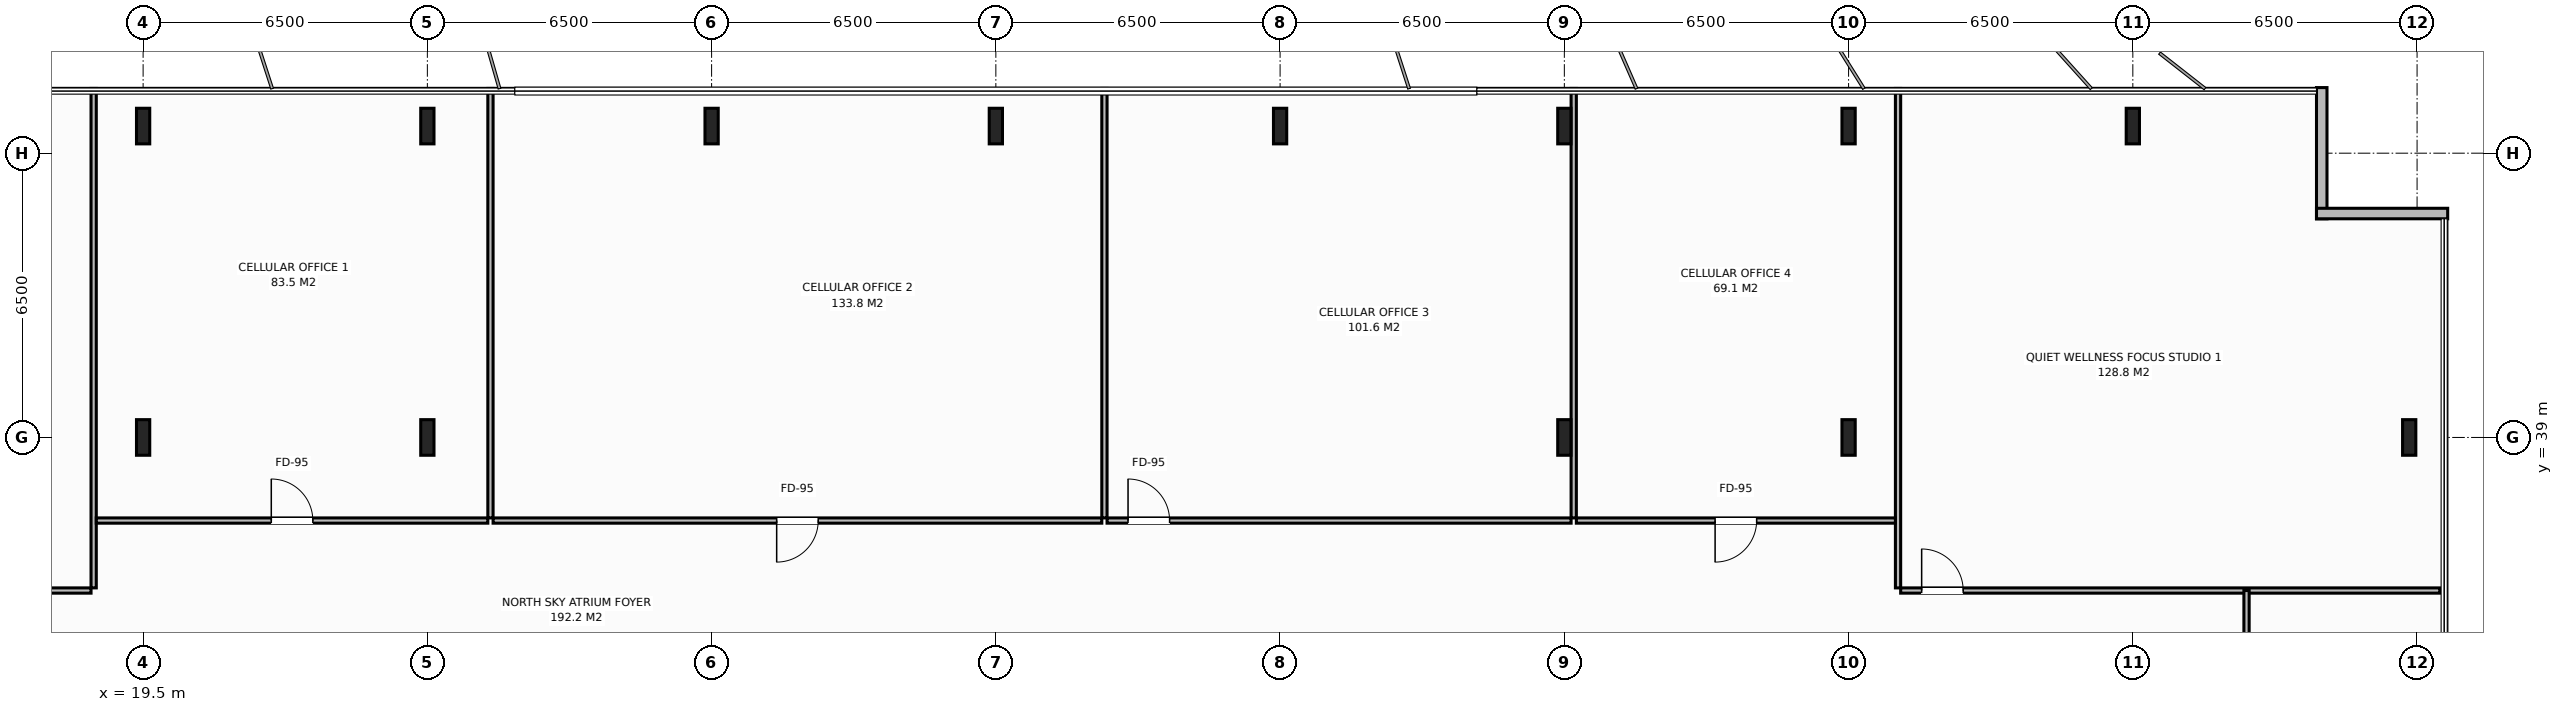
"""IFC4 building model, lengths in metres.
Left out: names, types, materials, properties, quantities, classifications, styles, units other than length and angle.
Written with IfcOpenShell. Run it as: python <this file> out.ifc"""

import sys

from ifc_helpers import new_model, si_unit, direction, frame, frame_2d, origin, origin_2d, place, context, subcontext, project, spatial, rectangle, i_section, extrude, element, fill, save


model = new_model("IFC4")
c1 = context("Model", 3, precision=1e-05, world=origin(), true_north=direction((0.0, 1.0)))
c2 = subcontext(c1, "Body", "Model", "MODEL_VIEW")
j1 = project(units=[si_unit("LENGTHUNIT", "METRE"), si_unit("PLANEANGLEUNIT", "RADIAN")], contexts=[c1])
p1 = place(None, origin())
s1 = spatial("IfcSite", under=j1, at=p1, CompositionType="ELEMENT")
p2 = place(p1, origin())
s2 = spatial("IfcBuilding", under=s1, at=p2, CompositionType="ELEMENT")
p3 = place(p2, frame((0.0, 0.0, 221.4)))
s3 = spatial("IfcBuildingStorey", under=s2, at=p3, CompositionType="ELEMENT", Elevation=221.4)
for number, where, z_axis, x_axis in (
    (1, (19.5, 39.0, 0.0), (0.0, 0.0, 1.0), (1.0, 0.0, 0.0)),
    (2, (58.5, 39.0, 0.0), (0.0, 0.0, 1.0), (1.0, 0.0, 0.0)),
    (3, (26.0, 39.0, 0.0), (0.0, 0.0, 1.0), (1.0, 0.0, 0.0)),
    (4, (52.0, 39.0, 0.0), (0.0, 0.0, 1.0), (1.0, 0.0, 0.0)),
    (5, (19.5, 46.12, 0.0), (0.0, 0.0, 1.0), (1.0, 0.0, 0.0)),
    (6, (26.0, 46.12, 0.0), (0.0, 0.0, 1.0), (1.0, 0.0, 0.0)),
    (7, (32.5, 46.12, 0.0), (0.0, 0.0, 1.0), (1.0, 0.0, 0.0)),
    (8, (39.0, 46.12, 0.0), (0.0, 0.0, 1.0), (1.0, 0.0, 0.0)),
    (9, (45.5, 46.12, 0.0), (0.0, 0.0, 1.0), (1.0, 0.0, 0.0)),
    (10, (52.0, 46.12, 0.0), (0.0, 0.0, 1.0), (1.0, 0.0, 0.0)),
    (11, (58.5, 46.12, 0.0), (0.0, 0.0, 1.0), (1.0, 0.0, 0.0)),
    (12, (65.0, 46.12, 0.0), (0.0, 0.0, 1.0), (1.0, 0.0, 0.0)),
    (13, (71.32, 39.0, 0.0), (0.0, 0.0, 1.0), (1.0, 0.0, 0.0)),
):
    element("IfcColumn", number, at=place(p3, frame(where, z_axis=z_axis, x_axis=x_axis)), inside=s3, PredefinedType="COLUMN", context=c2, shape_type="SweptSolid", body=[
        extrude(i_section(OverallWidth=0.303, OverallDepth=0.814, WebThickness=0.021, FlangeThickness=0.04, at=origin_2d()), origin(), (0.0, 0.0, 1.0), 3.8),
    ])
for number, where, z_axis, x_axis in (
    (14, (69.32, 47.0, 0.0), (0.0, 0.0, 1.0), (0.0, -1.0, 0.0)),
    (15, (69.2, 44.12, 0.0), (0.0, 0.0, 1.0), (1.0, 0.0, 0.0)),
):
    element("IfcWall", number, at=place(p3, frame(where, z_axis=z_axis, x_axis=x_axis)), inside=s3, PredefinedType="STANDARD", context=c2, shape_type="SweptSolid", body=[
        extrude(rectangle(XDim=3.0, YDim=0.24, at=frame_2d((1.5, 0.0))), origin(), (0.0, 0.0, 1.0), 3.58),
    ])
p4 = place(p3, frame((18.369, 35.56, 0.0), z_axis=(0.0, 0.0, 1.0), x_axis=(0.0, 1.0, 0.0)))
e16 = element("IfcWall", 16, at=p4, inside=s3, PredefinedType="PARTITIONING", context=c2, shape_type="SweptSolid", body=[
    extrude(rectangle(XDim=11.42, YDim=0.12, at=frame_2d((5.71, 0.0))), origin(), (0.0, 0.0, 1.0), 3.58),
])
p5 = place(p3, frame((5.98, 35.5, 0.0), z_axis=(0.0, 0.0, 1.0), x_axis=(1.0, 0.0, 0.0)))
e17 = element("IfcWall", 17, at=p5, inside=s3, PredefinedType="PARTITIONING", context=c2, shape_type="SweptSolid", body=[
    extrude(rectangle(XDim=12.329, YDim=0.12, at=frame_2d((6.165, 0.0))), origin(), (0.0, 0.0, 1.0), 3.58),
])
p6 = place(p5, frame((4.9, 0.0, 0.0)))
e18 = element("IfcOpeningElement", 18, at=p6, cuts=e17, PredefinedType="OPENING", context=c2, shape_type="SweptSolid", body=[
    extrude(rectangle(XDim=0.95, YDim=2.15, at=frame_2d((0.475, 1.075))), frame((0.0, 0.07, 0.0), z_axis=(0.0, -1.0, 0.0), x_axis=(1.0, 0.0, 0.0)), (0.0, 0.0, 1.0), 0.14),
])
p7 = place(p3, frame((27.443, 37.16, 0.0), z_axis=(0.0, 0.0, 1.0), x_axis=(0.0, 1.0, 0.0)))
e19 = element("IfcWall", 19, at=p7, inside=s3, PredefinedType="PARTITIONING", context=c2, shape_type="SweptSolid", body=[
    extrude(rectangle(XDim=9.82, YDim=0.12, at=frame_2d((4.91, 0.0))), origin(), (0.0, 0.0, 1.0), 3.58),
])
p8 = place(p3, frame((18.429, 37.1, 0.0), z_axis=(0.0, 0.0, 1.0), x_axis=(1.0, 0.0, 0.0)))
e20 = element("IfcWall", 20, at=p8, inside=s3, PredefinedType="PARTITIONING", context=c2, shape_type="SweptSolid", body=[
    extrude(rectangle(XDim=8.954, YDim=0.12, at=frame_2d((4.477, 0.0))), origin(), (0.0, 0.0, 1.0), 3.58),
])
p9 = place(p8, frame((4.002, 0.0, 0.0)))
e21 = element("IfcOpeningElement", 21, at=p9, cuts=e20, PredefinedType="OPENING", context=c2, shape_type="SweptSolid", body=[
    extrude(rectangle(XDim=0.95, YDim=2.15, at=frame_2d((0.475, 1.075))), frame((0.0, 0.07, 0.0), z_axis=(0.0, -1.0, 0.0), x_axis=(1.0, 0.0, 0.0)), (0.0, 0.0, 1.0), 0.14),
])
p10 = place(p3, frame((41.483, 37.16, 0.0), z_axis=(0.0, 0.0, 1.0), x_axis=(0.0, 1.0, 0.0)))
e22 = element("IfcWall", 22, at=p10, inside=s3, PredefinedType="PARTITIONING", context=c2, shape_type="SweptSolid", body=[
    extrude(rectangle(XDim=9.82, YDim=0.12, at=frame_2d((4.91, 0.0))), origin(), (0.0, 0.0, 1.0), 3.58),
])
p11 = place(p3, frame((27.503, 37.1, 0.0), z_axis=(0.0, 0.0, 1.0), x_axis=(1.0, 0.0, 0.0)))
e23 = element("IfcWall", 23, at=p11, inside=s3, PredefinedType="PARTITIONING", context=c2, shape_type="SweptSolid", body=[
    extrude(rectangle(XDim=13.92, YDim=0.12, at=frame_2d((6.96, 0.0))), origin(), (0.0, 0.0, 1.0), 3.58),
])
p12 = place(p11, frame((6.485, 0.0, 0.0)))
e24 = element("IfcOpeningElement", 24, at=p12, cuts=e23, PredefinedType="OPENING", context=c2, shape_type="SweptSolid", body=[
    extrude(rectangle(XDim=0.95, YDim=2.15, at=frame_2d((0.475, 1.075))), frame((0.0, 0.07, 0.0), z_axis=(0.0, -1.0, 0.0), x_axis=(1.0, 0.0, 0.0)), (0.0, 0.0, 1.0), 0.14),
])
p13 = place(p3, frame((52.215, 37.16, 0.0), z_axis=(0.0, 0.0, 1.0), x_axis=(0.0, 1.0, 0.0)))
e25 = element("IfcWall", 25, at=p13, inside=s3, PredefinedType="PARTITIONING", context=c2, shape_type="SweptSolid", body=[
    extrude(rectangle(XDim=9.82, YDim=0.12, at=frame_2d((4.91, 0.0))), origin(), (0.0, 0.0, 1.0), 2.88),
])
p14 = place(p3, frame((41.543, 37.1, 0.0), z_axis=(0.0, 0.0, 1.0), x_axis=(1.0, 0.0, 0.0)))
e26 = element("IfcWall", 26, at=p14, inside=s3, PredefinedType="PARTITIONING", context=c2, shape_type="SweptSolid", body=[
    extrude(rectangle(XDim=10.611, YDim=0.12, at=frame_2d((5.306, 0.0))), origin(), (0.0, 0.0, 1.0), 3.58),
])
p15 = place(p14, frame((0.48, 0.0, 0.0)))
e27 = element("IfcOpeningElement", 27, at=p15, cuts=e26, PredefinedType="OPENING", context=c2, shape_type="SweptSolid", body=[
    extrude(rectangle(XDim=0.95, YDim=2.15, at=frame_2d((0.475, 1.075))), frame((0.0, 0.07, 0.0), z_axis=(0.0, -1.0, 0.0), x_axis=(1.0, 0.0, 0.0)), (0.0, 0.0, 1.0), 0.14),
])
p16 = place(p3, frame((59.631, 35.56, 0.0), z_axis=(0.0, 0.0, 1.0), x_axis=(0.0, 1.0, 0.0)))
e28 = element("IfcWall", 28, at=p16, inside=s3, PredefinedType="PARTITIONING", context=c2, shape_type="SweptSolid", body=[
    extrude(rectangle(XDim=11.42, YDim=0.12, at=frame_2d((5.71, 0.0))), origin(), (0.0, 0.0, 1.0), 3.58),
])
p17 = place(p3, frame((52.275, 37.1, 0.0), z_axis=(0.0, 0.0, 1.0), x_axis=(1.0, 0.0, 0.0)))
e29 = element("IfcWall", 29, at=p17, inside=s3, PredefinedType="PARTITIONING", context=c2, shape_type="SweptSolid", body=[
    extrude(rectangle(XDim=7.296, YDim=0.12, at=frame_2d((3.648, 0.0))), origin(), (0.0, 0.0, 1.0), 3.58),
])
p18 = place(p17, frame((3.173, 0.0, 0.0)))
e30 = element("IfcOpeningElement", 30, at=p18, cuts=e29, PredefinedType="OPENING", context=c2, shape_type="SweptSolid", body=[
    extrude(rectangle(XDim=0.95, YDim=2.15, at=frame_2d((0.475, 1.075))), frame((0.0, 0.07, 0.0), z_axis=(0.0, -1.0, 0.0), x_axis=(1.0, 0.0, 0.0)), (0.0, 0.0, 1.0), 0.14),
])
p19 = place(p3, frame((59.691, 35.5, 0.0), z_axis=(0.0, 0.0, 1.0), x_axis=(1.0, 0.0, 0.0)))
e31 = element("IfcWall", 31, at=p19, inside=s3, PredefinedType="PARTITIONING", context=c2, shape_type="SweptSolid", body=[
    extrude(rectangle(XDim=12.329, YDim=0.12, at=frame_2d((6.165, 0.0))), origin(), (0.0, 0.0, 1.0), 3.58),
])
p20 = place(p19, frame((0.48, 0.0, 0.0)))
e32 = element("IfcOpeningElement", 32, at=p20, cuts=e31, PredefinedType="OPENING", context=c2, shape_type="SweptSolid", body=[
    extrude(rectangle(XDim=0.95, YDim=2.15, at=frame_2d((0.475, 1.075))), frame((0.0, 0.07, 0.0), z_axis=(0.0, -1.0, 0.0), x_axis=(1.0, 0.0, 0.0)), (0.0, 0.0, 1.0), 0.14),
])
p21 = place(p3, frame((67.6, 16.5, 0.0), z_axis=(0.0, 0.0, 1.0), x_axis=(0.0, 1.0, 0.0)))
e33 = element("IfcWall", 33, at=p21, inside=s3, PredefinedType="PARTITIONING", context=c2, shape_type="SweptSolid", body=[
    extrude(rectangle(XDim=19.0, YDim=0.12, at=frame_2d((9.5, 0.0))), origin(), (0.0, 0.0, 1.0), 3.58),
])
p22 = place(p21, frame((9.025, 0.0, 0.0)))
e34 = element("IfcOpeningElement", 34, at=p22, cuts=e33, PredefinedType="OPENING", context=c2, shape_type="SweptSolid", body=[
    extrude(rectangle(XDim=0.95, YDim=2.15, at=frame_2d((0.475, 1.075))), frame((0.0, 0.07, 0.0), z_axis=(0.0, -1.0, 0.0), x_axis=(1.0, 0.0, 0.0)), (0.0, 0.0, 1.0), 0.14),
])
p23 = place(p9, origin())
e35 = element("IfcDoor", 35, at=p23, inside=s3, OperationType="SINGLE_SWING_LEFT", PredefinedType="DOOR", context=c2, shape_type="SweptSolid", body=[
    extrude(rectangle(XDim=0.95, YDim=2.15, at=frame_2d((0.475, 1.075))), frame((0.0, 0.025, 0.0), z_axis=(0.0, -1.0, 0.0), x_axis=(1.0, 0.0, 0.0)), (0.0, 0.0, 1.0), 0.05),
])
fill(e21, e35)
p24 = place(p12, origin())
e36 = element("IfcDoor", 36, at=p24, inside=s3, OperationType="SINGLE_SWING_RIGHT", PredefinedType="DOOR", context=c2, shape_type="SweptSolid", body=[
    extrude(rectangle(XDim=0.95, YDim=2.15, at=frame_2d((0.475, 1.075))), frame((0.0, 0.025, 0.0), z_axis=(0.0, -1.0, 0.0), x_axis=(1.0, 0.0, 0.0)), (0.0, 0.0, 1.0), 0.05),
])
fill(e24, e36)
p25 = place(p15, origin())
e37 = element("IfcDoor", 37, at=p25, inside=s3, OperationType="SINGLE_SWING_LEFT", PredefinedType="DOOR", context=c2, shape_type="SweptSolid", body=[
    extrude(rectangle(XDim=0.95, YDim=2.15, at=frame_2d((0.475, 1.075))), frame((0.0, 0.025, 0.0), z_axis=(0.0, -1.0, 0.0), x_axis=(1.0, 0.0, 0.0)), (0.0, 0.0, 1.0), 0.05),
])
fill(e27, e37)
p26 = place(p18, origin())
e38 = element("IfcDoor", 38, at=p26, inside=s3, OperationType="SINGLE_SWING_RIGHT", PredefinedType="DOOR", context=c2, shape_type="SweptSolid", body=[
    extrude(rectangle(XDim=0.95, YDim=2.15, at=frame_2d((0.475, 1.075))), frame((0.0, 0.025, 0.0), z_axis=(0.0, -1.0, 0.0), x_axis=(1.0, 0.0, 0.0)), (0.0, 0.0, 1.0), 0.05),
])
fill(e30, e38)
p27 = place(p20, origin())
e39 = element("IfcDoor", 39, at=p27, inside=s3, OperationType="SINGLE_SWING_LEFT", PredefinedType="DOOR", context=c2, shape_type="SweptSolid", body=[
    extrude(rectangle(XDim=0.95, YDim=2.15, at=frame_2d((0.475, 1.075))), frame((0.0, 0.025, 0.0), z_axis=(0.0, -1.0, 0.0), x_axis=(1.0, 0.0, 0.0)), (0.0, 0.0, 1.0), 0.05),
])
fill(e32, e39)
save(model, sys.argv[1])
